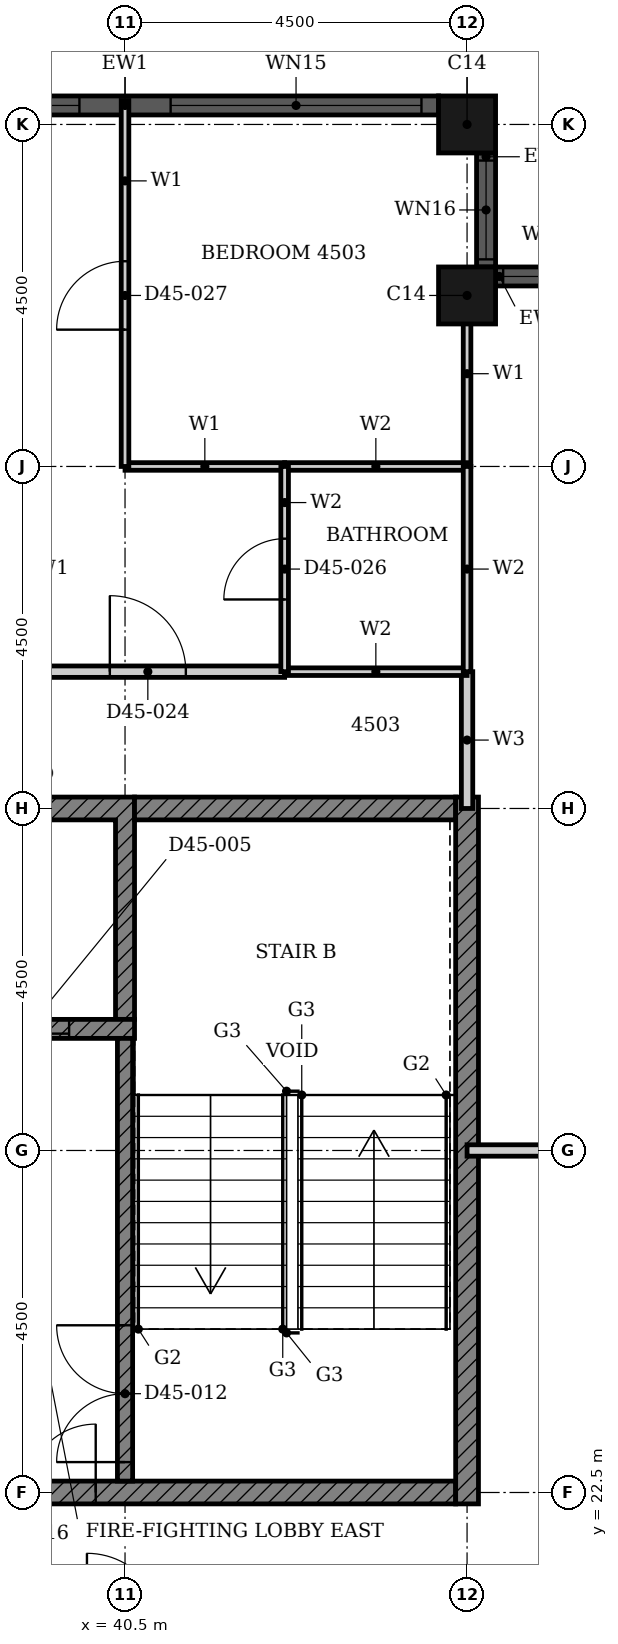
"""IFC4 building model, lengths in metres.
Left out: names, types, materials, properties, quantities, classifications, styles, units other than length and angle.
Written with IfcOpenShell. Run it as: python <this file> out.ifc"""

import sys

from ifc_helpers import new_model, si_unit, direction, frame, frame_2d, origin, origin_2d, place, context, subcontext, project, spatial, polyline, rectangle, hollow_rectangle, outline, extrude, element, fill, save


model = new_model("IFC4")
c1 = context("Model", 3, precision=1e-05, world=origin(), true_north=direction((0.0, 1.0)))
c2 = subcontext(c1, "Body", "Model", "MODEL_VIEW")
j1 = project(units=[si_unit("LENGTHUNIT", "METRE"), si_unit("PLANEANGLEUNIT", "RADIAN")], contexts=[c1])
p1 = place(None, origin())
s1 = spatial("IfcSite", under=j1, at=p1, CompositionType="ELEMENT")
p2 = place(p1, origin())
s2 = spatial("IfcBuilding", under=s1, at=p2, CompositionType="ELEMENT")
p3 = place(p2, frame((0.0, 0.0, 180.2)))
s3 = spatial("IfcBuildingStorey", under=s2, at=p3, CompositionType="ELEMENT", Elevation=180.2)
for number, where, z_axis, x_axis in (
    (1, (45.0, 38.25, 0.0), (0.0, 0.0, 1.0), (1.0, 0.0, 0.0)),
    (2, (45.0, 40.5, 0.0), (0.0, 0.0, 1.0), (1.0, 0.0, 0.0)),
):
    element("IfcColumn", number, at=place(p3, frame(where, z_axis=z_axis, x_axis=x_axis)), inside=s3, PredefinedType="COLUMN", context=c2, shape_type="SweptSolid", body=[
        extrude(hollow_rectangle(XDim=0.75, YDim=0.75, WallThickness=0.024, at=origin_2d()), origin(), (0.0, 0.0, 1.0), 3.7),
    ])
p4 = place(p3, frame((46.875, 38.5, 0.0), z_axis=(0.0, 0.0, 1.0), x_axis=(-1.0, 0.0, 0.0)))
e3 = element("IfcWall", 3, at=p4, inside=s3, PredefinedType="SOLIDWALL", context=c2, shape_type="SweptSolid", body=[
    extrude(rectangle(XDim=1.5, YDim=0.25, at=frame_2d((0.75, 0.0))), origin(), (0.0, 0.0, 1.0), 3.7),
])
p5 = place(p4, frame((0.1, 0.0, 0.9)))
e4 = element("IfcOpeningElement", 4, at=p5, cuts=e3, PredefinedType="OPENING", context=c2, shape_type="SweptSolid", body=[
    extrude(rectangle(XDim=1.3, YDim=1.85, at=frame_2d((0.65, 0.925))), frame((0.0, 0.135, 0.0), z_axis=(0.0, -1.0, 0.0), x_axis=(1.0, 0.0, 0.0)), (0.0, 0.0, 1.0), 0.27),
])
p6 = place(p3, frame((45.25, 38.625, 0.0), z_axis=(0.0, 0.0, 1.0), x_axis=(0.0, 1.0, 0.0)))
e5 = element("IfcWall", 5, at=p6, inside=s3, PredefinedType="SOLIDWALL", context=c2, shape_type="SweptSolid", body=[
    extrude(rectangle(XDim=1.5, YDim=0.25, at=frame_2d((0.75, 0.0))), origin(), (0.0, 0.0, 1.0), 3.7),
])
p7 = place(p6, frame((0.1, 0.0, 0.9)))
e6 = element("IfcOpeningElement", 6, at=p7, cuts=e5, PredefinedType="OPENING", context=c2, shape_type="SweptSolid", body=[
    extrude(rectangle(XDim=1.3, YDim=1.85, at=frame_2d((0.65, 0.925))), frame((0.0, 0.135, 0.0), z_axis=(0.0, -1.0, 0.0), x_axis=(1.0, 0.0, 0.0)), (0.0, 0.0, 1.0), 0.27),
])
p8 = place(p3, frame((44.625, 40.75, 0.0), z_axis=(0.0, 0.0, 1.0), x_axis=(-1.0, 0.0, 0.0)))
e7 = element("IfcWall", 7, at=p8, inside=s3, PredefinedType="SOLIDWALL", context=c2, shape_type="SweptSolid", body=[
    extrude(rectangle(XDim=8.25, YDim=0.25, at=frame_2d((4.125, 0.0))), origin(), (0.0, 0.0, 1.0), 3.7),
])
p9 = place(p8, frame((0.225, 0.0, 0.45)))
e8 = element("IfcOpeningElement", 8, at=p9, cuts=e7, PredefinedType="OPENING", context=c2, shape_type="SweptSolid", body=[
    extrude(rectangle(XDim=3.3, YDim=2.3, at=frame_2d((1.65, 1.15))), frame((0.0, 0.135, 0.0), z_axis=(0.0, -1.0, 0.0), x_axis=(1.0, 0.0, 0.0)), (0.0, 0.0, 1.0), 0.27),
])
p10 = place(p8, frame((4.725, 0.0, 0.45)))
e9 = element("IfcOpeningElement", 9, at=p10, cuts=e7, PredefinedType="OPENING", context=c2, shape_type="SweptSolid", body=[
    extrude(rectangle(XDim=3.3, YDim=2.3, at=frame_2d((1.65, 1.15))), frame((0.0, 0.135, 0.0), z_axis=(0.0, -1.0, 0.0), x_axis=(1.0, 0.0, 0.0)), (0.0, 0.0, 1.0), 0.27),
])
p11 = place(p3, origin())
e10 = element("IfcWall", 10, at=p11, inside=s3, PredefinedType="SHEAR", context=c2, shape_type="SweptSolid", body=[
    extrude(outline(polyline([(35.232, 28.725), (35.482, 28.725), (35.482, 31.35), (37.803, 31.35), (37.803, 28.725), (38.053, 28.725), (38.053, 31.35), (40.375, 31.35), (40.375, 28.725), (40.625, 28.725), (40.625, 31.65), (35.232, 31.65), (35.232, 28.725)])), origin(), (0.0, 0.0, 1.0), 3.4),
])
p12 = place(p3, frame((32.911, 22.5, 0.0), z_axis=(0.0, 0.0, 1.0), x_axis=(1.0, 0.0, 0.0)))
e11 = element("IfcWall", 11, at=p12, inside=s3, PredefinedType="SHEAR", context=c2, shape_type="SweptSolid", body=[
    extrude(rectangle(XDim=11.939, YDim=0.3, at=frame_2d((5.97, 0.0))), origin(), (0.0, 0.0, 1.0), 3.4),
])
p13 = place(p12, frame((5.404, 0.0, 0.0)))
e12 = element("IfcOpeningElement", 12, at=p13, cuts=e11, PredefinedType="OPENING", context=c2, shape_type="SweptSolid", body=[
    extrude(rectangle(XDim=1.8, YDim=2.1, at=frame_2d((0.9, 1.05))), frame((0.0, 0.16, 0.0), z_axis=(0.0, -1.0, 0.0), x_axis=(1.0, 0.0, 0.0)), (0.0, 0.0, 1.0), 0.32),
])
p14 = place(p3, frame((40.625, 31.5, 0.0), z_axis=(0.0, 0.0, 1.0), x_axis=(1.0, 0.0, 0.0)))
e13 = element("IfcWall", 13, at=p14, inside=s3, PredefinedType="SHEAR", context=c2, shape_type="SweptSolid", body=[
    extrude(rectangle(XDim=4.225, YDim=0.3, at=frame_2d((2.113, 0.0))), origin(), (0.0, 0.0, 1.0), 3.4),
])
p15 = place(p3, frame((45.0, 22.35, 0.0), z_axis=(0.0, 0.0, 1.0), x_axis=(0.0, 1.0, 0.0)))
e14 = element("IfcWall", 14, at=p15, inside=s3, PredefinedType="SHEAR", context=c2, shape_type="SweptSolid", body=[
    extrude(rectangle(XDim=9.3, YDim=0.3, at=frame_2d((4.65, 0.0))), origin(), (0.0, 0.0, 1.0), 3.4),
])
p16 = place(p3, frame((24.947, 28.6, 0.0), z_axis=(0.0, 0.0, 1.0), x_axis=(1.0, 0.0, 0.0)))
e15 = element("IfcWall", 15, at=p16, inside=s3, PredefinedType="SHEAR", context=c2, shape_type="SweptSolid", body=[
    extrude(rectangle(XDim=15.678, YDim=0.25, at=frame_2d((7.839, 0.0))), origin(), (0.0, 0.0, 1.0), 3.4),
])
p17 = place(p16, frame((6.004, 0.0, 0.0)))
e16 = element("IfcOpeningElement", 16, at=p17, cuts=e15, PredefinedType="OPENING", context=c2, shape_type="SweptSolid", body=[
    extrude(rectangle(XDim=1.1, YDim=2.1, at=frame_2d((0.55, 1.05))), frame((0.0, 0.135, 0.0), z_axis=(0.0, -1.0, 0.0), x_axis=(1.0, 0.0, 0.0)), (0.0, 0.0, 1.0), 0.27),
])
p18 = place(p16, frame((11.146, 0.0, 0.0)))
e17 = element("IfcOpeningElement", 17, at=p18, cuts=e15, PredefinedType="OPENING", context=c2, shape_type="SweptSolid", body=[
    extrude(rectangle(XDim=1.1, YDim=2.1, at=frame_2d((0.55, 1.05))), frame((0.0, 0.135, 0.0), z_axis=(0.0, -1.0, 0.0), x_axis=(1.0, 0.0, 0.0)), (0.0, 0.0, 1.0), 0.27),
])
p19 = place(p16, frame((13.718, 0.0, 0.0)))
e18 = element("IfcOpeningElement", 18, at=p19, cuts=e15, PredefinedType="OPENING", context=c2, shape_type="SweptSolid", body=[
    extrude(rectangle(XDim=1.1, YDim=2.1, at=frame_2d((0.55, 1.05))), frame((0.0, 0.135, 0.0), z_axis=(0.0, -1.0, 0.0), x_axis=(1.0, 0.0, 0.0)), (0.0, 0.0, 1.0), 0.27),
])
p20 = place(p16, frame((0.961, 0.0, 0.0)))
e19 = element("IfcOpeningElement", 19, at=p20, cuts=e15, PredefinedType="OPENING", context=c2, shape_type="SweptSolid", body=[
    extrude(rectangle(XDim=0.9, YDim=2.1, at=frame_2d((0.45, 1.05))), frame((0.0, 0.135, 0.0), z_axis=(0.0, -1.0, 0.0), x_axis=(1.0, 0.0, 0.0)), (0.0, 0.0, 1.0), 0.27),
])
p21 = place(p16, frame((8.675, 0.0, 0.0)))
e20 = element("IfcOpeningElement", 20, at=p21, cuts=e15, PredefinedType="OPENING", context=c2, shape_type="SweptSolid", body=[
    extrude(rectangle(XDim=0.9, YDim=2.1, at=frame_2d((0.45, 1.05))), frame((0.0, 0.135, 0.0), z_axis=(0.0, -1.0, 0.0), x_axis=(1.0, 0.0, 0.0)), (0.0, 0.0, 1.0), 0.27),
])
p22 = place(p3, frame((40.5, 22.65, 0.0), z_axis=(0.0, 0.0, 1.0), x_axis=(0.0, 1.0, 0.0)))
e21 = element("IfcWall", 21, at=p22, inside=s3, PredefinedType="SHEAR", context=c2, shape_type="SweptSolid", body=[
    extrude(rectangle(XDim=5.825, YDim=0.2, at=frame_2d((2.913, 0.0))), origin(), (0.0, 0.0, 1.0), 3.4),
])
p23 = place(p22, frame((0.25, 0.0, 0.0)))
e22 = element("IfcOpeningElement", 22, at=p23, cuts=e21, PredefinedType="OPENING", context=c2, shape_type="SweptSolid", body=[
    extrude(rectangle(XDim=1.8, YDim=2.1, at=frame_2d((0.9, 1.05))), frame((0.0, 0.11, 0.0), z_axis=(0.0, -1.0, 0.0), x_axis=(1.0, 0.0, 0.0)), (0.0, 0.0, 1.0), 0.22),
])
p24 = place(p3, frame((45.0, 27.0, 0.0), z_axis=(0.0, 0.0, 1.0), x_axis=(1.0, 0.0, 0.0)))
e23 = element("IfcWall", 23, at=p24, inside=s3, PredefinedType="PARTITIONING", context=c2, shape_type="SweptSolid", body=[
    extrude(rectangle(XDim=13.5, YDim=0.15, at=frame_2d((6.75, 0.0))), origin(), (0.0, 0.0, 1.0), 2.68),
])
p25 = place(p24, frame((7.15, 0.0, 0.0)))
e24 = element("IfcOpeningElement", 24, at=p25, cuts=e23, PredefinedType="OPENING", context=c2, shape_type="SweptSolid", body=[
    extrude(rectangle(XDim=1.0, YDim=2.1, at=frame_2d((0.5, 1.05))), frame((0.0, 0.085, 0.0), z_axis=(0.0, -1.0, 0.0), x_axis=(1.0, 0.0, 0.0)), (0.0, 0.0, 1.0), 0.17),
])
p26 = place(p3, frame((29.4, 33.3, 0.0), z_axis=(0.0, 0.0, 1.0), x_axis=(1.0, 0.0, 0.0)))
e25 = element("IfcWall", 25, at=p26, inside=s3, PredefinedType="PARTITIONING", context=c2, shape_type="SweptSolid", body=[
    extrude(rectangle(XDim=13.2, YDim=0.15, at=frame_2d((6.6, 0.0))), origin(), (0.0, 0.0, 1.0), 3.4),
])
p27 = place(p26, frame((1.3, 0.0, 0.0)))
e26 = element("IfcOpeningElement", 26, at=p27, cuts=e25, PredefinedType="OPENING", context=c2, shape_type="SweptSolid", body=[
    extrude(rectangle(XDim=1.0, YDim=2.2, at=frame_2d((0.5, 1.1))), frame((0.0, 0.085, 0.0), z_axis=(0.0, -1.0, 0.0), x_axis=(1.0, 0.0, 0.0)), (0.0, 0.0, 1.0), 0.17),
])
p28 = place(p26, frame((10.9, 0.0, 0.0)))
e27 = element("IfcOpeningElement", 27, at=p28, cuts=e25, PredefinedType="OPENING", context=c2, shape_type="SweptSolid", body=[
    extrude(rectangle(XDim=1.0, YDim=2.2, at=frame_2d((0.5, 1.1))), frame((0.0, 0.085, 0.0), z_axis=(0.0, -1.0, 0.0), x_axis=(1.0, 0.0, 0.0)), (0.0, 0.0, 1.0), 0.17),
])
p29 = place(p3, frame((45.0, 31.5, 0.0), z_axis=(0.0, 0.0, 1.0), x_axis=(0.0, 1.0, 0.0)))
e28 = element("IfcWall", 28, at=p29, inside=s3, PredefinedType="PARTITIONING", context=c2, shape_type="SweptSolid", body=[
    extrude(rectangle(XDim=1.8, YDim=0.15, at=frame_2d((0.9, 0.0))), origin(), (0.0, 0.0, 1.0), 3.4),
])
p30 = place(p3, frame((40.5, 36.0, 0.0), z_axis=(0.0, 0.0, 1.0), x_axis=(1.0, 0.0, 0.0)))
e29 = element("IfcWall", 29, at=p30, inside=s3, PredefinedType="PARTITIONING", context=c2, shape_type="SweptSolid", body=[
    extrude(rectangle(XDim=2.1, YDim=0.1, at=frame_2d((1.05, 0.0))), origin(), (0.0, 0.0, 1.0), 3.4),
])
p31 = place(p3, frame((40.5, 36.0, 0.0), z_axis=(0.0, 0.0, 1.0), x_axis=(0.0, 1.0, 0.0)))
e30 = element("IfcWall", 30, at=p31, inside=s3, PredefinedType="PARTITIONING", context=c2, shape_type="SweptSolid", body=[
    extrude(rectangle(XDim=4.815, YDim=0.1, at=frame_2d((2.407, 0.0))), origin(), (0.0, 0.0, 1.0), 3.4),
])
p32 = place(p31, frame((1.8, 0.0, 0.0)))
e31 = element("IfcOpeningElement", 31, at=p32, cuts=e30, PredefinedType="OPENING", context=c2, shape_type="SweptSolid", body=[
    extrude(rectangle(XDim=0.9, YDim=2.1, at=frame_2d((0.45, 1.05))), frame((0.0, 0.06, 0.0), z_axis=(0.0, -1.0, 0.0), x_axis=(1.0, 0.0, 0.0)), (0.0, 0.0, 1.0), 0.12),
])
p33 = place(p3, frame((45.0, 36.001, 0.0), z_axis=(0.0, 0.0, 1.0), x_axis=(0.0, 1.0, 0.0)))
e32 = element("IfcWall", 32, at=p33, inside=s3, PredefinedType="PARTITIONING", context=c2, shape_type="SweptSolid", body=[
    extrude(rectangle(XDim=2.439, YDim=0.1, at=frame_2d((1.219, 0.0))), origin(), (0.0, 0.0, 1.0), 3.4),
])
for number, where, z_axis, x_axis in (
    (33, (42.6, 33.3, 0.0), (0.0, 0.0, 1.0), (1.0, 0.0, 0.0)),
    (34, (42.6, 36.0, 0.0), (0.0, 0.0, 1.0), (1.0, 0.0, 0.0)),
):
    element("IfcWall", number, at=place(p3, frame(where, z_axis=z_axis, x_axis=x_axis)), inside=s3, PredefinedType="PARTITIONING", context=c2, shape_type="SweptSolid", body=[
        extrude(rectangle(XDim=2.4, YDim=0.1, at=frame_2d((1.2, 0.0))), origin(), (0.0, 0.0, 1.0), 3.4),
    ])
p34 = place(p3, frame((42.6, 33.3, 0.0), z_axis=(0.0, 0.0, 1.0), x_axis=(0.0, 1.0, 0.0)))
e35 = element("IfcWall", 35, at=p34, inside=s3, PredefinedType="PARTITIONING", context=c2, shape_type="SweptSolid", body=[
    extrude(rectangle(XDim=2.7, YDim=0.1, at=frame_2d((1.35, 0.0))), origin(), (0.0, 0.0, 1.0), 3.4),
])
p35 = place(p34, frame((0.95, 0.0, 0.0)))
e36 = element("IfcOpeningElement", 36, at=p35, cuts=e35, PredefinedType="OPENING", context=c2, shape_type="SweptSolid", body=[
    extrude(rectangle(XDim=0.8, YDim=2.1, at=frame_2d((0.4, 1.05))), frame((0.0, 0.06, 0.0), z_axis=(0.0, -1.0, 0.0), x_axis=(1.0, 0.0, 0.0)), (0.0, 0.0, 1.0), 0.12),
])
p36 = place(p3, frame((45.0, 33.3, 0.0), z_axis=(0.0, 0.0, 1.0), x_axis=(0.0, 1.0, 0.0)))
e37 = element("IfcWall", 37, at=p36, inside=s3, PredefinedType="PARTITIONING", context=c2, shape_type="SweptSolid", body=[
    extrude(rectangle(XDim=2.7, YDim=0.1, at=frame_2d((1.35, 0.0))), origin(), (0.0, 0.0, 1.0), 3.4),
])
p37 = place(p5, origin())
e38 = element("IfcWindow", 38, at=p37, inside=s3, PartitioningType="SINGLE_PANEL", PredefinedType="WINDOW", context=c2, shape_type="SweptSolid", body=[
    extrude(rectangle(XDim=1.3, YDim=1.85, at=frame_2d((0.65, 0.925))), frame((0.0, 0.03, 0.0), z_axis=(0.0, -1.0, 0.0), x_axis=(1.0, 0.0, 0.0)), (0.0, 0.0, 1.0), 0.06),
])
fill(e4, e38)
p38 = place(p7, origin())
e39 = element("IfcWindow", 39, at=p38, inside=s3, PartitioningType="SINGLE_PANEL", PredefinedType="WINDOW", context=c2, shape_type="SweptSolid", body=[
    extrude(rectangle(XDim=1.3, YDim=1.85, at=frame_2d((0.65, 0.925))), frame((0.0, 0.03, 0.0), z_axis=(0.0, -1.0, 0.0), x_axis=(1.0, 0.0, 0.0)), (0.0, 0.0, 1.0), 0.06),
])
fill(e6, e39)
p39 = place(p9, origin())
e40 = element("IfcWindow", 40, at=p39, inside=s3, PartitioningType="SINGLE_PANEL", PredefinedType="WINDOW", context=c2, shape_type="SweptSolid", body=[
    extrude(rectangle(XDim=3.3, YDim=2.3, at=frame_2d((1.65, 1.15))), frame((0.0, 0.03, 0.0), z_axis=(0.0, -1.0, 0.0), x_axis=(1.0, 0.0, 0.0)), (0.0, 0.0, 1.0), 0.06),
])
fill(e8, e40)
p40 = place(p10, origin())
e41 = element("IfcWindow", 41, at=p40, inside=s3, PartitioningType="SINGLE_PANEL", PredefinedType="WINDOW", context=c2, shape_type="SweptSolid", body=[
    extrude(rectangle(XDim=3.3, YDim=2.3, at=frame_2d((1.65, 1.15))), frame((0.0, 0.03, 0.0), z_axis=(0.0, -1.0, 0.0), x_axis=(1.0, 0.0, 0.0)), (0.0, 0.0, 1.0), 0.06),
])
fill(e9, e41)
p41 = place(p19, origin())
e42 = element("IfcDoor", 42, at=p41, inside=s3, OperationType="DOUBLE_DOOR_SLIDING", PredefinedType="DOOR", context=c2, shape_type="SweptSolid", body=[
    extrude(rectangle(XDim=1.1, YDim=2.1, at=frame_2d((0.55, 1.05))), frame((0.0, 0.025, 0.0), z_axis=(0.0, -1.0, 0.0), x_axis=(1.0, 0.0, 0.0)), (0.0, 0.0, 1.0), 0.05),
])
fill(e18, e42)
p42 = place(p23, origin())
e43 = element("IfcDoor", 43, at=p42, inside=s3, OperationType="DOUBLE_DOOR_SINGLE_SWING", PredefinedType="DOOR", context=c2, shape_type="SweptSolid", body=[
    extrude(rectangle(XDim=1.8, YDim=2.1, at=frame_2d((0.9, 1.05))), frame((0.0, 0.025, 0.0), z_axis=(0.0, -1.0, 0.0), x_axis=(1.0, 0.0, 0.0)), (0.0, 0.0, 1.0), 0.05),
])
fill(e22, e43)
p43 = place(p13, origin())
e44 = element("IfcDoor", 44, at=p43, inside=s3, OperationType="DOUBLE_DOOR_SINGLE_SWING", PredefinedType="DOOR", context=c2, shape_type="SweptSolid", body=[
    extrude(rectangle(XDim=1.8, YDim=2.1, at=frame_2d((0.9, 1.05))), frame((0.0, 0.025, 0.0), z_axis=(0.0, -1.0, 0.0), x_axis=(1.0, 0.0, 0.0)), (0.0, 0.0, 1.0), 0.05),
])
fill(e12, e44)
p44 = place(p28, origin())
e45 = element("IfcDoor", 45, at=p44, inside=s3, OperationType="SINGLE_SWING_LEFT", PredefinedType="DOOR", context=c2, shape_type="SweptSolid", body=[
    extrude(rectangle(XDim=1.0, YDim=2.2, at=frame_2d((0.5, 1.1))), frame((0.0, 0.025, 0.0), z_axis=(0.0, -1.0, 0.0), x_axis=(1.0, 0.0, 0.0)), (0.0, 0.0, 1.0), 0.05),
])
fill(e27, e45)
p45 = place(p35, origin())
e46 = element("IfcDoor", 46, at=p45, inside=s3, OperationType="SINGLE_SWING_RIGHT", PredefinedType="DOOR", context=c2, shape_type="SweptSolid", body=[
    extrude(rectangle(XDim=0.8, YDim=2.1, at=frame_2d((0.4, 1.05))), frame((0.0, 0.025, 0.0), z_axis=(0.0, -1.0, 0.0), x_axis=(1.0, 0.0, 0.0)), (0.0, 0.0, 1.0), 0.05),
])
fill(e36, e46)
p46 = place(p32, origin())
e47 = element("IfcDoor", 47, at=p46, inside=s3, OperationType="SINGLE_SWING_LEFT", PredefinedType="DOOR", context=c2, shape_type="SweptSolid", body=[
    extrude(rectangle(XDim=0.9, YDim=2.1, at=frame_2d((0.45, 1.05))), frame((0.0, 0.025, 0.0), z_axis=(0.0, -1.0, 0.0), x_axis=(1.0, 0.0, 0.0)), (0.0, 0.0, 1.0), 0.05),
])
fill(e31, e47)
save(model, sys.argv[1])
